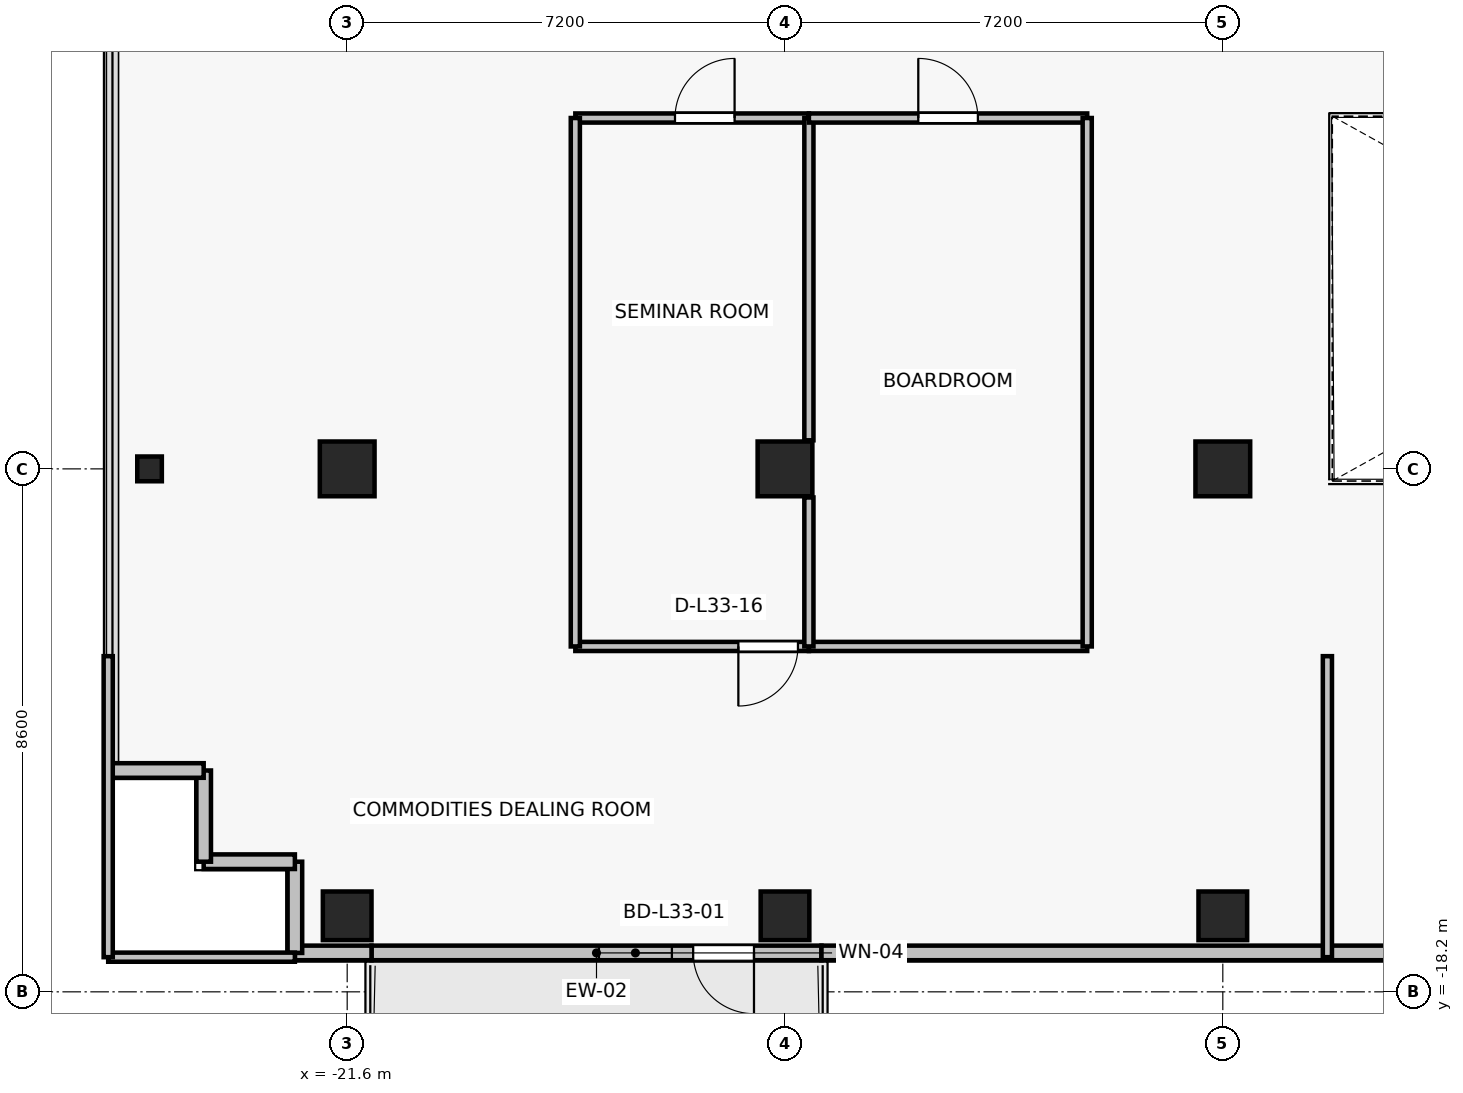
"""IFC4 building model, lengths in metres.
Left out: names, types, materials, properties, quantities, classifications, styles, units other than length and angle.
Written with IfcOpenShell. Run it as: python <this file> out.ifc"""

import sys

from ifc_helpers import new_model, si_unit, direction, frame, frame_2d, origin, origin_2d, place, context, subcontext, project, spatial, rectangle, i_section, extrude, source, transform, mapped, element, fill, save


model = new_model("IFC4")
c1 = context("Model", 3, precision=1e-05, world=origin(), true_north=direction((0.0, 1.0)))
c2 = subcontext(c1, "Body", "Model", "MODEL_VIEW")
j1 = project(units=[si_unit("LENGTHUNIT", "METRE"), si_unit("PLANEANGLEUNIT", "RADIAN")], contexts=[c1])
p1 = place(None, origin())
s1 = spatial("IfcSite", under=j1, at=p1, CompositionType="ELEMENT")
p2 = place(p1, origin())
s2 = spatial("IfcBuilding", under=s1, at=p2, CompositionType="ELEMENT")
p3 = place(p2, frame((0.0, 0.0, 119.8)))
s3 = spatial("IfcBuildingStorey", under=s2, at=p3, CompositionType="ELEMENT", Elevation=119.8)
for number, where, z_axis, x_axis in (
    (1, (-14.4, -9.6, 0.0), (0.0, 0.0, 1.0), (1.0, 0.0, 0.0)),
    (2, (-7.2, -9.6, 0.0), (0.0, 0.0, 1.0), (1.0, 0.0, 0.0)),
    (3, (-21.6, -9.6, 0.0), (0.0, 0.0, 1.0), (1.0, 0.0, 0.0)),
):
    element("IfcColumn", number, at=place(p3, frame(where, z_axis=z_axis, x_axis=x_axis)), inside=s3, PredefinedType="COLUMN", context=c2, shape_type="SweptSolid", body=[
        extrude(rectangle(XDim=0.9, YDim=0.9, at=origin_2d()), origin(), (0.0, 0.0, 1.0), 3.3),
    ])
for number, where, z_axis, x_axis in (
    (4, (-14.4, -16.95, 0.0), (0.0, 0.0, 1.0), (1.0, 0.0, 0.0)),
    (5, (-7.2, -16.95, 0.0), (0.0, 0.0, 1.0), (1.0, 0.0, 0.0)),
    (6, (-21.6, -16.95, 0.0), (0.0, 0.0, 1.0), (1.0, 0.0, 0.0)),
):
    element("IfcColumn", number, at=place(p3, frame(where, z_axis=z_axis, x_axis=x_axis)), inside=s3, PredefinedType="COLUMN", context=c2, shape_type="SweptSolid", body=[
        extrude(rectangle(XDim=0.8, YDim=0.8, at=origin_2d()), origin(), (0.0, 0.0, 1.0), 3.3),
    ])
p4 = place(p3, frame((-24.85, -9.6, 0.0), z_axis=(0.0, 0.0, 1.0), x_axis=(1.0, 0.0, 0.0)))
e7 = element("IfcColumn", 7, at=p4, inside=s3, PredefinedType="COLUMN", context=c2, shape_type="SweptSolid", body=[
    extrude(i_section(OverallWidth=0.404, OverallDepth=0.407, WebThickness=0.022, FlangeThickness=0.032, FilletRadius=0.015, at=origin_2d()), origin(), (0.0, 0.0, 1.0), 3.3),
])
p5 = place(p3, frame((-13.8, -17.56, 0.0), z_axis=(0.0, 0.0, 1.0), x_axis=(-1.0, 0.0, 0.0)))
e8 = element("IfcWall", 8, at=p5, inside=s3, PredefinedType="SOLIDWALL", context=c2, shape_type="SweptSolid", body=[
    extrude(rectangle(XDim=7.4, YDim=0.24, at=frame_2d((3.7, 0.0))), origin(), (0.0, 0.0, 1.0), 2.665),
])
p6 = place(p5, frame((1.11, 0.0, 0.0)))
e9 = element("IfcOpeningElement", 9, at=p6, cuts=e8, PredefinedType="OPENING", context=c2, shape_type="SweptSolid", body=[
    extrude(rectangle(XDim=1.0, YDim=2.2, at=frame_2d((0.5, 1.1))), frame((0.0, 0.13, 0.0), z_axis=(0.0, -1.0, 0.0), x_axis=(1.0, 0.0, 0.0)), (0.0, 0.0, 1.0), 0.26),
])
p7 = place(p5, frame((2.46, 0.0, 0.85)))
e10 = element("IfcOpeningElement", 10, at=p7, cuts=e8, PredefinedType="OPENING", context=c2, shape_type="SweptSolid", body=[
    extrude(rectangle(XDim=1.2, YDim=1.5, at=frame_2d((0.6, 0.75))), frame((0.0, 0.13, 0.0), z_axis=(0.0, -1.0, 0.0), x_axis=(1.0, 0.0, 0.0)), (0.0, 0.0, 1.0), 0.26),
])
p8 = place(p3, frame((-13.8, -17.56, 0.0), z_axis=(0.0, 0.0, 1.0), x_axis=(1.0, 0.0, 0.0)))
e11 = element("IfcWall", 11, at=p8, inside=s3, PredefinedType="SOLIDWALL", context=c2, shape_type="SweptSolid", body=[
    extrude(rectangle(XDim=10.46, YDim=0.24, at=frame_2d((5.23, 0.0))), origin(), (0.0, 0.0, 1.0), 2.665),
])
p9 = place(p3, frame((-22.46, -17.56, 0.0), z_axis=(0.0, 0.0, 1.0), x_axis=(1.0, 0.0, 0.0)))
e12 = element("IfcWall", 12, at=p9, inside=s3, PredefinedType="SOLIDWALL", context=c2, shape_type="SweptSolid", body=[
    extrude(rectangle(XDim=1.26, YDim=0.24, at=frame_2d((0.63, 0.0))), origin(), (0.0, 0.0, 1.0), 3.075),
])
p10 = place(p3, frame((-22.46, -16.06, 0.0), z_axis=(0.0, 0.0, 1.0), x_axis=(0.0, -1.0, 0.0)))
e13 = element("IfcWall", 13, at=p10, inside=s3, PredefinedType="SOLIDWALL", context=c2, shape_type="SweptSolid", body=[
    extrude(rectangle(XDim=1.5, YDim=0.24, at=frame_2d((0.75, 0.0))), origin(), (0.0, 0.0, 1.0), 2.565),
])
for number, where, z_axis, x_axis in (
    (14, (-23.96, -16.06, 0.0), (0.0, 0.0, 1.0), (1.0, 0.0, 0.0)),
    (15, (-23.96, -14.56, 0.0), (0.0, 0.0, 1.0), (0.0, -1.0, 0.0)),
    (16, (-25.46, -14.56, 0.0), (0.0, 0.0, 1.0), (1.0, 0.0, 0.0)),
):
    element("IfcWall", number, at=place(p3, frame(where, z_axis=z_axis, x_axis=x_axis)), inside=s3, PredefinedType="SOLIDWALL", context=c2, shape_type="SweptSolid", body=[
        extrude(rectangle(XDim=1.5, YDim=0.24, at=frame_2d((0.75, 0.0))), origin(), (0.0, 0.0, 1.0), 3.075),
    ])
p11 = place(p3, frame((-14.007, -12.52, 0.0), z_axis=(0.0, 0.0, 1.0), x_axis=(-1.0, 0.0, 0.0)))
e17 = element("IfcWall", 17, at=p11, inside=s3, PredefinedType="PARTITIONING", context=c2, shape_type="SweptSolid", body=[
    extrude(rectangle(XDim=3.841, YDim=0.15, at=frame_2d((1.92, 0.0))), origin(), (0.0, 0.0, 1.0), 2.515),
])
p12 = place(p11, frame((0.18, 0.0, 0.0)))
e18 = element("IfcOpeningElement", 18, at=p12, cuts=e17, PredefinedType="OPENING", context=c2, shape_type="SweptSolid", body=[
    extrude(rectangle(XDim=0.98, YDim=2.15, at=frame_2d((0.49, 1.075))), frame((0.0, 0.085, 0.0), z_axis=(0.0, -1.0, 0.0), x_axis=(1.0, 0.0, 0.0)), (0.0, 0.0, 1.0), 0.17),
])
p13 = place(p3, frame((-17.848, -3.83, 0.0), z_axis=(0.0, 0.0, 1.0), x_axis=(1.0, 0.0, 0.0)))
e19 = element("IfcWall", 19, at=p13, inside=s3, PredefinedType="PARTITIONING", context=c2, shape_type="SweptSolid", body=[
    extrude(rectangle(XDim=3.841, YDim=0.15, at=frame_2d((1.92, 0.0))), origin(), (0.0, 0.0, 1.0), 2.515),
])
p14 = place(p13, frame((1.639, 0.0, 0.0)))
e20 = element("IfcOpeningElement", 20, at=p14, cuts=e19, PredefinedType="OPENING", context=c2, shape_type="SweptSolid", body=[
    extrude(rectangle(XDim=0.98, YDim=2.15, at=frame_2d((0.49, 1.075))), frame((0.0, 0.085, 0.0), z_axis=(0.0, -1.0, 0.0), x_axis=(1.0, 0.0, 0.0)), (0.0, 0.0, 1.0), 0.17),
])
p15 = place(p3, frame((-17.848, -12.52, 0.0), z_axis=(0.0, 0.0, 1.0), x_axis=(0.0, 1.0, 0.0)))
e21 = element("IfcWall", 21, at=p15, inside=s3, PredefinedType="PARTITIONING", context=c2, shape_type="SweptSolid", body=[
    extrude(rectangle(XDim=8.69, YDim=0.15, at=frame_2d((4.345, 0.0))), origin(), (0.0, 0.0, 1.0), 2.515),
])
p16 = place(p3, frame((-14.007, -3.83, 0.0), z_axis=(0.0, 0.0, 1.0), x_axis=(0.0, -1.0, 0.0)))
e22 = element("IfcWall", 22, at=p16, inside=s3, PredefinedType="PARTITIONING", context=c2, shape_type="SweptSolid", body=[
    extrude(rectangle(XDim=5.3, YDim=0.15, at=frame_2d((2.65, 0.0))), origin(), (0.0, 0.0, 1.0), 2.615),
])
p17 = place(p3, frame((-9.43, -12.52, 0.0), z_axis=(0.0, 0.0, 1.0), x_axis=(-1.0, 0.0, 0.0)))
e23 = element("IfcWall", 23, at=p17, inside=s3, PredefinedType="PARTITIONING", context=c2, shape_type="SweptSolid", body=[
    extrude(rectangle(XDim=4.577, YDim=0.15, at=frame_2d((2.289, 0.0))), origin(), (0.0, 0.0, 1.0), 2.665),
])
p18 = place(p3, frame((-14.007, -3.83, 0.0), z_axis=(0.0, 0.0, 1.0), x_axis=(1.0, 0.0, 0.0)))
e24 = element("IfcWall", 24, at=p18, inside=s3, PredefinedType="PARTITIONING", context=c2, shape_type="SweptSolid", body=[
    extrude(rectangle(XDim=4.577, YDim=0.15, at=frame_2d((2.289, 0.0))), origin(), (0.0, 0.0, 1.0), 3.075),
])
p19 = place(p18, frame((1.799, 0.0, 0.0)))
e25 = element("IfcOpeningElement", 25, at=p19, cuts=e24, PredefinedType="OPENING", context=c2, shape_type="SweptSolid", body=[
    extrude(rectangle(XDim=0.98, YDim=2.15, at=frame_2d((0.49, 1.075))), frame((0.0, 0.085, 0.0), z_axis=(0.0, -1.0, 0.0), x_axis=(1.0, 0.0, 0.0)), (0.0, 0.0, 1.0), 0.17),
])
p20 = place(p3, frame((-14.007, -12.52, 0.0), z_axis=(0.0, 0.0, 1.0), x_axis=(0.0, 1.0, 0.0)))
e26 = element("IfcWall", 26, at=p20, inside=s3, PredefinedType="PARTITIONING", context=c2, shape_type="SweptSolid", body=[
    extrude(rectangle(XDim=2.45, YDim=0.15, at=frame_2d((1.225, 0.0))), origin(), (0.0, 0.0, 1.0), 3.075),
])
p21 = place(p3, frame((-9.43, -3.83, 0.0), z_axis=(0.0, 0.0, 1.0), x_axis=(0.0, -1.0, 0.0)))
e27 = element("IfcWall", 27, at=p21, inside=s3, PredefinedType="PARTITIONING", context=c2, shape_type="SweptSolid", body=[
    extrude(rectangle(XDim=8.69, YDim=0.15, at=frame_2d((4.345, 0.0))), origin(), (0.0, 0.0, 1.0), 2.515),
])
p22 = place(p3, frame((-22.46, -17.63, 0.0), z_axis=(0.0, 0.0, 1.0), x_axis=(-1.0, 0.0, 0.0)))
e28 = element("IfcWall", 28, at=p22, inside=s3, PredefinedType="PARTITIONING", context=c2, shape_type="SweptSolid", body=[
    extrude(rectangle(XDim=3.07, YDim=0.15, at=frame_2d((1.535, 0.0))), origin(), (0.0, 0.0, 1.0), 2.665),
])
p23 = place(p3, frame((-25.53, -17.63, 0.0), z_axis=(0.0, 0.0, 1.0), x_axis=(0.0, 1.0, 0.0)))
e29 = element("IfcWall", 29, at=p23, inside=s3, PredefinedType="PARTITIONING", context=c2, shape_type="SweptSolid", body=[
    extrude(rectangle(XDim=4.95, YDim=0.15, at=frame_2d((2.475, 0.0))), origin(), (0.0, 0.0, 1.0), 3.075),
])
p24 = place(p3, frame((-5.48, -12.68, 0.0), z_axis=(0.0, 0.0, 1.0), x_axis=(0.0, -1.0, 0.0)))
e30 = element("IfcWall", 30, at=p24, inside=s3, PredefinedType="PARTITIONING", context=c2, shape_type="SweptSolid", body=[
    extrude(rectangle(XDim=4.95, YDim=0.15, at=frame_2d((2.475, 0.0))), origin(), (0.0, 0.0, 1.0), 2.565),
])
m1 = source(origin(), c2, "Body", "SweptSolid", [
    extrude(rectangle(XDim=1.0, YDim=2.2, at=frame_2d((0.5, 1.1))), frame((0.0, 0.025, 0.0), z_axis=(0.0, -1.0, 0.0), x_axis=(1.0, 0.0, 0.0)), (0.0, 0.0, 1.0), 0.05),
])
p25 = place(p6, origin())
e31 = element("IfcDoor", 31, at=p25, inside=s3, OperationType="SINGLE_SWING_LEFT", PredefinedType="DOOR", context=c2, shape_type="MappedRepresentation", body=[
    mapped(m1, transform((0.0, 0.0, 0.0), x_axis=(1.0, 0.0, 0.0), y_axis=(0.0, 1.0, 0.0), z_axis=(0.0, 0.0, 1.0), scale=1.0)),
])
fill(e9, e31)
m2 = source(origin(), c2, "Body", "SweptSolid", [
    extrude(rectangle(XDim=1.2, YDim=1.5, at=frame_2d((0.6, 0.75))), frame((0.0, 0.03, 0.0), z_axis=(0.0, -1.0, 0.0), x_axis=(1.0, 0.0, 0.0)), (0.0, 0.0, 1.0), 0.06),
])
p26 = place(p7, origin())
e32 = element("IfcWindow", 32, at=p26, inside=s3, PartitioningType="SINGLE_PANEL", PredefinedType="WINDOW", context=c2, shape_type="MappedRepresentation", body=[
    mapped(m2, transform((0.0, 0.0, 0.0), x_axis=(1.0, 0.0, 0.0), y_axis=(0.0, 1.0, 0.0), z_axis=(0.0, 0.0, 1.0), scale=1.0)),
])
fill(e10, e32)
m3 = source(origin(), c2, "Body", "SweptSolid", [
    extrude(rectangle(XDim=0.98, YDim=2.15, at=frame_2d((0.49, 1.075))), frame((0.0, 0.025, 0.0), z_axis=(0.0, -1.0, 0.0), x_axis=(1.0, 0.0, 0.0)), (0.0, 0.0, 1.0), 0.05),
])
p27 = place(p14, origin())
e33 = element("IfcDoor", 33, at=p27, inside=s3, OperationType="SINGLE_SWING_RIGHT", PredefinedType="DOOR", context=c2, shape_type="MappedRepresentation", body=[
    mapped(m3, transform((0.0, 0.0, 0.0), x_axis=(1.0, 0.0, 0.0), y_axis=(0.0, 1.0, 0.0), z_axis=(0.0, 0.0, 1.0), scale=1.0)),
])
fill(e20, e33)
p28 = place(p19, origin())
e34 = element("IfcDoor", 34, at=p28, inside=s3, OperationType="SINGLE_SWING_LEFT", PredefinedType="DOOR", context=c2, shape_type="MappedRepresentation", body=[
    mapped(m3, transform((0.0, 0.0, 0.0), x_axis=(1.0, 0.0, 0.0), y_axis=(0.0, 1.0, 0.0), z_axis=(0.0, 0.0, 1.0), scale=1.0)),
])
fill(e25, e34)
p29 = place(p12, origin())
e35 = element("IfcDoor", 35, at=p29, inside=s3, OperationType="SINGLE_SWING_RIGHT", PredefinedType="DOOR", context=c2, shape_type="MappedRepresentation", body=[
    mapped(m3, transform((0.0, 0.0, 0.0), x_axis=(1.0, 0.0, 0.0), y_axis=(0.0, 1.0, 0.0), z_axis=(0.0, 0.0, 1.0), scale=1.0)),
])
fill(e18, e35)
save(model, sys.argv[1])
